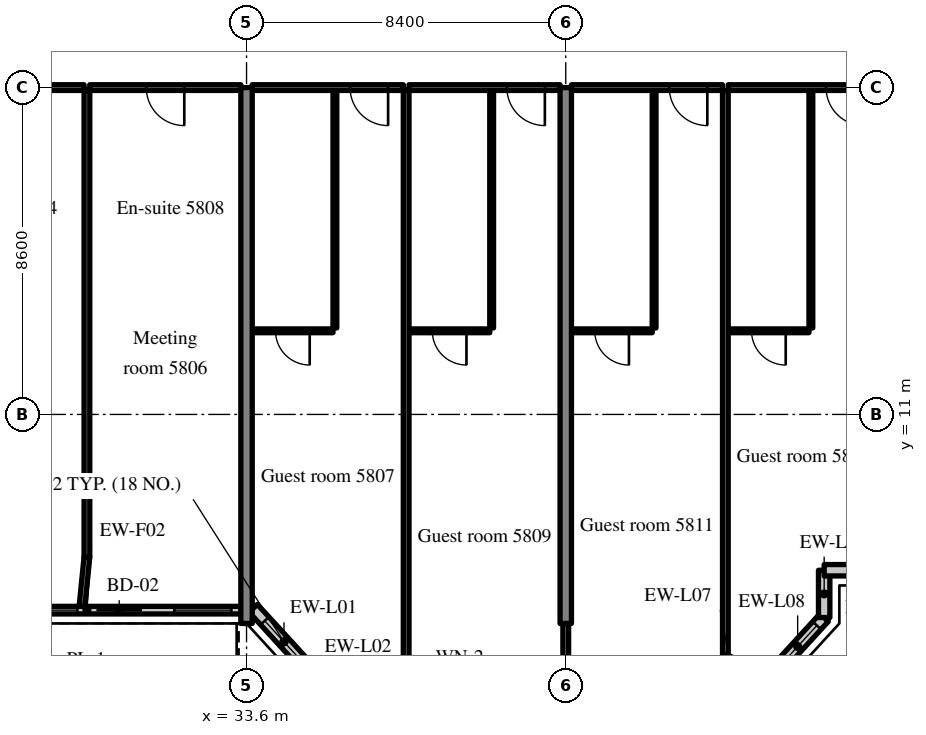
"""IFC4 building model, lengths in metres.
Left out: names, types, materials, properties, quantities, classifications, styles, units other than length and angle.
Written with IfcOpenShell. Run it as: python <this file> out.ifc"""

import sys

from ifc_helpers import new_model, si_unit, direction, frame, frame_2d, origin, place, context, subcontext, project, spatial, rectangle, extrude, source, transform, mapped, element, fill, save


model = new_model("IFC4")
c1 = context("Model", 3, precision=1e-05, world=origin(), true_north=direction((0.0, 1.0)))
c2 = subcontext(c1, "Body", "Model", "MODEL_VIEW")
j1 = project(units=[si_unit("LENGTHUNIT", "METRE"), si_unit("PLANEANGLEUNIT", "RADIAN")], contexts=[c1])
p1 = place(None, origin())
s1 = spatial("IfcSite", under=j1, at=p1, CompositionType="ELEMENT")
p2 = place(p1, origin())
s2 = spatial("IfcBuilding", under=s1, at=p2, CompositionType="ELEMENT")
p3 = place(p2, frame((0.0, 0.0, 241.3)))
s3 = spatial("IfcBuildingStorey", under=s2, at=p3, CompositionType="ELEMENT", Elevation=241.3)
m1 = source(origin(), c2, "Body", "SweptSolid", [
    extrude(rectangle(XDim=14.1, YDim=0.3, at=frame_2d((7.05, 0.0))), origin(), (0.0, 0.0, 1.0), 3.62),
])
for number, where, z_axis, x_axis in (
    (1, (33.6, 5.5, 0.0), (0.0, 0.0, 1.0), (0.0, 1.0, 0.0)),
    (2, (42.0, 5.5, 0.0), (0.0, 0.0, 1.0), (0.0, 1.0, 0.0)),
):
    element("IfcWall", number, at=place(p3, frame(where, z_axis=z_axis, x_axis=x_axis)), inside=s3, PredefinedType="SHEAR", context=c2, shape_type="MappedRepresentation", body=[
        mapped(m1, transform((0.0, 0.0, 0.0), scale=1.0)),
    ])
m2 = source(origin(), c2, "Body", "SweptSolid", [
    extrude(rectangle(XDim=8.1, YDim=0.2, at=frame_2d((4.05, 0.0))), origin(), (0.0, 0.0, 1.0), 3.02),
])
p4 = place(p3, frame((25.35, 5.85, 0.0), z_axis=(0.0, 0.0, 1.0), x_axis=(1.0, 0.0, 0.0)))
e3 = element("IfcWall", 3, at=p4, inside=s3, PredefinedType="SOLIDWALL", context=c2, shape_type="MappedRepresentation", body=[
    mapped(m2, transform((0.0, 0.0, 0.0), scale=1.0)),
])
m3 = source(origin(), c2, "Body", "SweptSolid", [
    extrude(rectangle(XDim=1.2, YDim=2.4, at=frame_2d((0.6, 1.2))), frame((0.0, 0.11, 0.0), z_axis=(0.0, -1.0, 0.0), x_axis=(1.0, 0.0, 0.0)), (0.0, 0.0, 1.0), 0.22),
])
p5 = place(p4, frame((0.25, 0.0, 0.0)))
e4 = element("IfcOpeningElement", 4, at=p5, cuts=e3, PredefinedType="OPENING", context=c2, shape_type="MappedRepresentation", body=[
    mapped(m3, transform((0.0, 0.0, 0.0), scale=1.0)),
])
m4 = source(origin(), c2, "Body", "SweptSolid", [
    extrude(rectangle(XDim=1.5, YDim=1.5, at=frame_2d((0.75, 0.75))), frame((0.0, 0.11, 0.0), z_axis=(0.0, -1.0, 0.0), x_axis=(1.0, 0.0, 0.0)), (0.0, 0.0, 1.0), 0.22),
])
p6 = place(p4, frame((2.3, 0.0, 0.9)))
e5 = element("IfcOpeningElement", 5, at=p6, cuts=e3, PredefinedType="OPENING", context=c2, shape_type="MappedRepresentation", body=[
    mapped(m4, transform((0.0, 0.0, 0.0), scale=1.0)),
])
p7 = place(p4, frame((4.3, 0.0, 0.0)))
e6 = element("IfcOpeningElement", 6, at=p7, cuts=e3, PredefinedType="OPENING", context=c2, shape_type="MappedRepresentation", body=[
    mapped(m3, transform((0.0, 0.0, 0.0), scale=1.0)),
])
p8 = place(p4, frame((6.35, 0.0, 0.9)))
e7 = element("IfcOpeningElement", 7, at=p8, cuts=e3, PredefinedType="OPENING", context=c2, shape_type="MappedRepresentation", body=[
    mapped(m4, transform((0.0, 0.0, 0.0), scale=1.0)),
])
m5 = source(origin(), c2, "Body", "SweptSolid", [
    extrude(rectangle(XDim=2.398, YDim=0.3, at=frame_2d((1.199, 0.0))), origin(), (0.0, 0.0, 1.0), 3.62),
])
p9 = place(p3, frame((33.776, 5.9, 0.0), z_axis=(0.0, 0.0, 1.0), x_axis=(0.675374189419, -0.737475222815, 0.0)))
e8 = element("IfcWall", 8, at=p9, inside=s3, PredefinedType="SOLIDWALL", context=c2, shape_type="MappedRepresentation", body=[
    mapped(m5, transform((0.0, 0.0, 0.0), scale=1.0)),
])
m6 = source(origin(), c2, "Body", "SweptSolid", [
    extrude(rectangle(XDim=1.5, YDim=2.0, at=frame_2d((0.75, 1.0))), frame((0.0, 0.16, 0.0), z_axis=(0.0, -1.0, 0.0), x_axis=(1.0, 0.0, 0.0)), (0.0, 0.0, 1.0), 0.32),
])
p10 = place(p9, frame((0.449, 0.0, 0.9)))
e9 = element("IfcOpeningElement", 9, at=p10, cuts=e8, PredefinedType="OPENING", context=c2, shape_type="MappedRepresentation", body=[
    mapped(m6, transform((0.0, 0.0, 0.0), scale=1.0)),
])
m7 = source(origin(), c2, "Body", "SweptSolid", [
    extrude(rectangle(XDim=2.067, YDim=0.3, at=frame_2d((1.033, 0.0))), origin(), (0.0, 0.0, 1.0), 3.62),
])
p11 = place(p3, frame((47.404, 4.131, 0.0), z_axis=(0.0, 0.0, 1.0), x_axis=(0.675355439877, 0.737492393065, 0.0)))
e10 = element("IfcWall", 10, at=p11, inside=s3, PredefinedType="SOLIDWALL", context=c2, shape_type="MappedRepresentation", body=[
    mapped(m7, transform((0.0, 0.0, 0.0), scale=1.0)),
])
p12 = place(p11, frame((0.283, 0.0, 0.9)))
e11 = element("IfcOpeningElement", 11, at=p12, cuts=e10, PredefinedType="OPENING", context=c2, shape_type="MappedRepresentation", body=[
    mapped(m6, transform((0.0, 0.0, 0.0), scale=1.0)),
])
m8 = source(origin(), c2, "Body", "SweptSolid", [
    extrude(rectangle(XDim=1.244, YDim=0.3, at=frame_2d((0.622, 0.0))), origin(), (0.0, 0.0, 1.0), 3.62),
])
p13 = place(p3, frame((48.8, 5.656, 0.0), z_axis=(0.0, 0.0, 1.0), x_axis=(0.0, 1.0, 0.0)))
e12 = element("IfcWall", 12, at=p13, inside=s3, PredefinedType="SOLIDWALL", context=c2, shape_type="MappedRepresentation", body=[
    mapped(m8, transform((0.0, 0.0, 0.0), scale=1.0)),
])
m9 = source(origin(), c2, "Body", "SweptSolid", [
    extrude(rectangle(XDim=3.2, YDim=0.3, at=frame_2d((1.6, 0.0))), origin(), (0.0, 0.0, 1.0), 3.62),
])
p14 = place(p3, frame((48.8, 6.9, 0.0), z_axis=(0.0, 0.0, 1.0), x_axis=(1.0, 0.0, 0.0)))
e13 = element("IfcWall", 13, at=p14, inside=s3, PredefinedType="SOLIDWALL", context=c2, shape_type="MappedRepresentation", body=[
    mapped(m9, transform((0.0, 0.0, 0.0), scale=1.0)),
])
m10 = source(origin(), c2, "Body", "SweptSolid", [
    extrude(rectangle(XDim=3.975, YDim=0.15, at=frame_2d((1.987, 0.0))), origin(), (0.0, 0.0, 1.0), 2.92),
])
p15 = place(p3, frame((25.35, 19.6, 0.0), z_axis=(0.0, 0.0, 1.0), x_axis=(1.0, 0.0, 0.0)))
e14 = element("IfcWall", 14, at=p15, inside=s3, PredefinedType="PARTITIONING", context=c2, shape_type="MappedRepresentation", body=[
    mapped(m10, transform((0.0, 0.0, 0.0), scale=1.0)),
])
m11 = source(origin(), c2, "Body", "SweptSolid", [
    extrude(rectangle(XDim=1.0, YDim=2.1, at=frame_2d((0.5, 1.05))), frame((0.0, 0.085, 0.0), z_axis=(0.0, -1.0, 0.0), x_axis=(1.0, 0.0, 0.0)), (0.0, 0.0, 1.0), 0.17),
])
p16 = place(p15, frame((1.487, 0.0, 0.0)))
e15 = element("IfcOpeningElement", 15, at=p16, cuts=e14, PredefinedType="OPENING", context=c2, shape_type="MappedRepresentation", body=[
    mapped(m11, transform((0.0, 0.0, 0.0), scale=1.0)),
])
p17 = place(p3, frame((29.475, 19.6, 0.0), z_axis=(0.0, 0.0, 1.0), x_axis=(1.0, 0.0, 0.0)))
e16 = element("IfcWall", 16, at=p17, inside=s3, PredefinedType="PARTITIONING", context=c2, shape_type="MappedRepresentation", body=[
    mapped(m10, transform((0.0, 0.0, 0.0), scale=1.0)),
])
p18 = place(p17, frame((1.487, 0.0, 0.0)))
e17 = element("IfcOpeningElement", 17, at=p18, cuts=e16, PredefinedType="OPENING", context=c2, shape_type="MappedRepresentation", body=[
    mapped(m11, transform((0.0, 0.0, 0.0), scale=1.0)),
])
m12 = source(origin(), c2, "Body", "SweptSolid", [
    extrude(rectangle(XDim=12.275, YDim=0.15, at=frame_2d((6.137, 0.0))), origin(), (0.0, 0.0, 1.0), 3.62),
])
p19 = place(p3, frame((29.4, 7.25, 0.0), z_axis=(0.0, 0.0, 1.0), x_axis=(0.0, 1.0, 0.0)))
e18 = element("IfcWall", 18, at=p19, inside=s3, PredefinedType="PARTITIONING", context=c2, shape_type="MappedRepresentation", body=[
    mapped(m12, transform((0.0, 0.0, 0.0), scale=1.0)),
])
m13 = source(origin(), c2, "Body", "SweptSolid", [
    extrude(rectangle(XDim=6.25, YDim=0.1, at=frame_2d((3.125, 0.0))), origin(), (0.0, 0.0, 1.0), 3.62),
])
p20 = place(p3, frame((35.925, 13.275, 0.0), z_axis=(0.0, 0.0, 1.0), x_axis=(0.0, 1.0, 0.0)))
e19 = element("IfcWall", 19, at=p20, inside=s3, PredefinedType="PARTITIONING", context=c2, shape_type="MappedRepresentation", body=[
    mapped(m13, transform((0.0, 0.0, 0.0), scale=1.0)),
])
m14 = source(origin(), c2, "Body", "SweptSolid", [
    extrude(rectangle(XDim=2.125, YDim=0.1, at=frame_2d((1.062, 0.0))), origin(), (0.0, 0.0, 1.0), 3.62),
])
p21 = place(p3, frame((33.75, 13.2, 0.0), z_axis=(0.0, 0.0, 1.0), x_axis=(1.0, 0.0, 0.0)))
e20 = element("IfcWall", 20, at=p21, inside=s3, PredefinedType="PARTITIONING", context=c2, shape_type="MappedRepresentation", body=[
    mapped(m14, transform((0.0, 0.0, 0.0), scale=1.0)),
])
m15 = source(origin(), c2, "Body", "SweptSolid", [
    extrude(rectangle(XDim=0.9, YDim=2.1, at=frame_2d((0.45, 1.05))), frame((0.0, 0.06, 0.0), z_axis=(0.0, -1.0, 0.0), x_axis=(1.0, 0.0, 0.0)), (0.0, 0.0, 1.0), 0.12),
])
p22 = place(p21, frame((0.612, 0.0, 0.0)))
e21 = element("IfcOpeningElement", 21, at=p22, cuts=e20, PredefinedType="OPENING", context=c2, shape_type="MappedRepresentation", body=[
    mapped(m15, transform((0.0, 0.0, 0.0), scale=1.0)),
])
m16 = source(origin(), c2, "Body", "SweptSolid", [
    extrude(rectangle(XDim=3.975, YDim=0.15, at=frame_2d((1.988, 0.0))), origin(), (0.0, 0.0, 1.0), 2.92),
])
p23 = place(p3, frame((33.75, 19.6, 0.0), z_axis=(0.0, 0.0, 1.0), x_axis=(1.0, 0.0, 0.0)))
e22 = element("IfcWall", 22, at=p23, inside=s3, PredefinedType="PARTITIONING", context=c2, shape_type="MappedRepresentation", body=[
    mapped(m16, transform((0.0, 0.0, 0.0), scale=1.0)),
])
p24 = place(p23, frame((2.575, 0.0, 0.0)))
e23 = element("IfcOpeningElement", 23, at=p24, cuts=e22, PredefinedType="OPENING", context=c2, shape_type="MappedRepresentation", body=[
    mapped(m11, transform((0.0, 0.0, 0.0), scale=1.0)),
])
p25 = place(p3, frame((40.05, 13.275, 0.0), z_axis=(0.0, 0.0, 1.0), x_axis=(0.0, 1.0, 0.0)))
e24 = element("IfcWall", 24, at=p25, inside=s3, PredefinedType="PARTITIONING", context=c2, shape_type="MappedRepresentation", body=[
    mapped(m13, transform((0.0, 0.0, 0.0), scale=1.0)),
])
p26 = place(p3, frame((37.875, 13.2, 0.0), z_axis=(0.0, 0.0, 1.0), x_axis=(1.0, 0.0, 0.0)))
e25 = element("IfcWall", 25, at=p26, inside=s3, PredefinedType="PARTITIONING", context=c2, shape_type="MappedRepresentation", body=[
    mapped(m14, transform((0.0, 0.0, 0.0), scale=1.0)),
])
p27 = place(p26, frame((0.612, 0.0, 0.0)))
e26 = element("IfcOpeningElement", 26, at=p27, cuts=e25, PredefinedType="OPENING", context=c2, shape_type="MappedRepresentation", body=[
    mapped(m15, transform((0.0, 0.0, 0.0), scale=1.0)),
])
p28 = place(p3, frame((37.875, 19.6, 0.0), z_axis=(0.0, 0.0, 1.0), x_axis=(1.0, 0.0, 0.0)))
e27 = element("IfcWall", 27, at=p28, inside=s3, PredefinedType="PARTITIONING", context=c2, shape_type="MappedRepresentation", body=[
    mapped(m16, transform((0.0, 0.0, 0.0), scale=1.0)),
])
p29 = place(p28, frame((2.575, 0.0, 0.0)))
e28 = element("IfcOpeningElement", 28, at=p29, cuts=e27, PredefinedType="OPENING", context=c2, shape_type="MappedRepresentation", body=[
    mapped(m11, transform((0.0, 0.0, 0.0), scale=1.0)),
])
m17 = source(origin(), c2, "Body", "SweptSolid", [
    extrude(rectangle(XDim=15.498, YDim=0.15, at=frame_2d((7.749, 0.0))), origin(), (0.0, 0.0, 1.0), 3.62),
])
p30 = place(p3, frame((37.8, 4.027, 0.0), z_axis=(0.0, 0.0, 1.0), x_axis=(0.0, 1.0, 0.0)))
e29 = element("IfcWall", 29, at=p30, inside=s3, PredefinedType="PARTITIONING", context=c2, shape_type="MappedRepresentation", body=[
    mapped(m17, transform((0.0, 0.0, 0.0), scale=1.0)),
])
p31 = place(p3, frame((44.325, 13.275, 0.0), z_axis=(0.0, 0.0, 1.0), x_axis=(0.0, 1.0, 0.0)))
e30 = element("IfcWall", 30, at=p31, inside=s3, PredefinedType="PARTITIONING", context=c2, shape_type="MappedRepresentation", body=[
    mapped(m13, transform((0.0, 0.0, 0.0), scale=1.0)),
])
p32 = place(p3, frame((42.15, 13.2, 0.0), z_axis=(0.0, 0.0, 1.0), x_axis=(1.0, 0.0, 0.0)))
e31 = element("IfcWall", 31, at=p32, inside=s3, PredefinedType="PARTITIONING", context=c2, shape_type="MappedRepresentation", body=[
    mapped(m14, transform((0.0, 0.0, 0.0), scale=1.0)),
])
p33 = place(p32, frame((0.613, 0.0, 0.0)))
e32 = element("IfcOpeningElement", 32, at=p33, cuts=e31, PredefinedType="OPENING", context=c2, shape_type="MappedRepresentation", body=[
    mapped(m15, transform((0.0, 0.0, 0.0), scale=1.0)),
])
p34 = place(p3, frame((42.15, 19.6, 0.0), z_axis=(0.0, 0.0, 1.0), x_axis=(1.0, 0.0, 0.0)))
e33 = element("IfcWall", 33, at=p34, inside=s3, PredefinedType="PARTITIONING", context=c2, shape_type="MappedRepresentation", body=[
    mapped(m16, transform((0.0, 0.0, 0.0), scale=1.0)),
])
p35 = place(p34, frame((2.575, 0.0, 0.0)))
e34 = element("IfcOpeningElement", 34, at=p35, cuts=e33, PredefinedType="OPENING", context=c2, shape_type="MappedRepresentation", body=[
    mapped(m11, transform((0.0, 0.0, 0.0), scale=1.0)),
])
p36 = place(p3, frame((48.45, 13.275, 0.0), z_axis=(0.0, 0.0, 1.0), x_axis=(0.0, 1.0, 0.0)))
e35 = element("IfcWall", 35, at=p36, inside=s3, PredefinedType="PARTITIONING", context=c2, shape_type="MappedRepresentation", body=[
    mapped(m13, transform((0.0, 0.0, 0.0), scale=1.0)),
])
p37 = place(p3, frame((46.275, 13.2, 0.0), z_axis=(0.0, 0.0, 1.0), x_axis=(1.0, 0.0, 0.0)))
e36 = element("IfcWall", 36, at=p37, inside=s3, PredefinedType="PARTITIONING", context=c2, shape_type="MappedRepresentation", body=[
    mapped(m14, transform((0.0, 0.0, 0.0), scale=1.0)),
])
p38 = place(p37, frame((0.613, 0.0, 0.0)))
e37 = element("IfcOpeningElement", 37, at=p38, cuts=e36, PredefinedType="OPENING", context=c2, shape_type="MappedRepresentation", body=[
    mapped(m15, transform((0.0, 0.0, 0.0), scale=1.0)),
])
p39 = place(p3, frame((46.275, 19.6, 0.0), z_axis=(0.0, 0.0, 1.0), x_axis=(1.0, 0.0, 0.0)))
e38 = element("IfcWall", 38, at=p39, inside=s3, PredefinedType="PARTITIONING", context=c2, shape_type="MappedRepresentation", body=[
    mapped(m16, transform((0.0, 0.0, 0.0), scale=1.0)),
])
p40 = place(p39, frame((2.575, 0.0, 0.0)))
e39 = element("IfcOpeningElement", 39, at=p40, cuts=e38, PredefinedType="OPENING", context=c2, shape_type="MappedRepresentation", body=[
    mapped(m11, transform((0.0, 0.0, 0.0), scale=1.0)),
])
m18 = source(origin(), c2, "Body", "SweptSolid", [
    extrude(rectangle(XDim=14.906, YDim=0.15, at=frame_2d((7.453, 0.0))), origin(), (0.0, 0.0, 1.0), 3.62),
])
p41 = place(p3, frame((46.2, 4.619, 0.0), z_axis=(0.0, 0.0, 1.0), x_axis=(0.0, 1.0, 0.0)))
e40 = element("IfcWall", 40, at=p41, inside=s3, PredefinedType="PARTITIONING", context=c2, shape_type="MappedRepresentation", body=[
    mapped(m18, transform((0.0, 0.0, 0.0), scale=1.0)),
])
m19 = source(origin(), c2, "Body", "SweptSolid", [
    extrude(rectangle(XDim=2.178, YDim=0.15, at=frame_2d((1.089, 0.0))), origin(), (0.0, 0.0, 1.0), 3.62),
])
p42 = place(p3, frame((42.0, 3.322, 0.0), z_axis=(0.0, 0.0, 1.0), x_axis=(0.0, 1.0, 0.0)))
e41 = element("IfcWall", 41, at=p42, inside=s3, PredefinedType="PARTITIONING", context=c2, shape_type="MappedRepresentation", body=[
    mapped(m19, transform((0.0, 0.0, 0.0), scale=1.0)),
])
m20 = source(origin(), c2, "Body", "SweptSolid", [
    extrude(rectangle(XDim=1.307, YDim=0.15, at=frame_2d((0.653, 0.0))), origin(), (0.0, 0.0, 1.0), 3.62),
])
p43 = place(p3, frame((29.27, 5.95, 0.0), z_axis=(0.0, 0.0, 1.0), x_axis=(0.099411212066, 0.995046436562, 0.0)))
e42 = element("IfcWall", 42, at=p43, inside=s3, PredefinedType="PARTITIONING", context=c2, shape_type="MappedRepresentation", body=[
    mapped(m20, transform((0.0, 0.0, 0.0), scale=1.0)),
])
m21 = source(origin(), c2, "Body", "SweptSolid", [
    extrude(rectangle(XDim=1.058, YDim=0.15, at=frame_2d((0.529, 0.0))), origin(), (0.0, 0.0, 1.0), 3.62),
])
p44 = place(p3, frame((47.14, 4.134, 0.0), z_axis=(0.0, 0.0, 1.0), x_axis=(-0.888723819054, 0.458442988218, 0.0)))
e43 = element("IfcWall", 43, at=p44, inside=s3, PredefinedType="PARTITIONING", context=c2, shape_type="MappedRepresentation", body=[
    mapped(m21, transform((0.0, 0.0, 0.0), scale=1.0)),
])
m22 = source(origin(), c2, "Body", "SweptSolid", [
    extrude(rectangle(XDim=1.5, YDim=1.5, at=frame_2d((0.75, 0.75))), frame((0.0, 0.03, 0.0), z_axis=(0.0, -1.0, 0.0), x_axis=(1.0, 0.0, 0.0)), (0.0, 0.0, 1.0), 0.06),
])
p45 = place(p6, origin())
e44 = element("IfcWindow", 44, at=p45, inside=s3, PartitioningType="SINGLE_PANEL", PredefinedType="WINDOW", context=c2, shape_type="MappedRepresentation", body=[
    mapped(m22, transform((0.0, 0.0, 0.0), scale=1.0)),
])
fill(e5, e44)
m23 = source(origin(), c2, "Body", "SweptSolid", [
    extrude(rectangle(XDim=1.2, YDim=2.4, at=frame_2d((0.6, 1.2))), frame((0.0, 0.025, 0.0), z_axis=(0.0, -1.0, 0.0), x_axis=(1.0, 0.0, 0.0)), (0.0, 0.0, 1.0), 0.05),
])
p46 = place(p7, origin())
e45 = element("IfcDoor", 45, at=p46, inside=s3, OperationType="SLIDING_TO_RIGHT", PredefinedType="DOOR", context=c2, shape_type="MappedRepresentation", body=[
    mapped(m23, transform((0.0, 0.0, 0.0), scale=1.0)),
])
fill(e6, e45)
p47 = place(p8, origin())
e46 = element("IfcWindow", 46, at=p47, inside=s3, PartitioningType="SINGLE_PANEL", PredefinedType="WINDOW", context=c2, shape_type="MappedRepresentation", body=[
    mapped(m22, transform((0.0, 0.0, 0.0), scale=1.0)),
])
fill(e7, e46)
m24 = source(origin(), c2, "Body", "SweptSolid", [
    extrude(rectangle(XDim=1.5, YDim=2.0, at=frame_2d((0.75, 1.0))), frame((0.0, 0.03, 0.0), z_axis=(0.0, -1.0, 0.0), x_axis=(1.0, 0.0, 0.0)), (0.0, 0.0, 1.0), 0.06),
])
p48 = place(p10, origin())
e47 = element("IfcWindow", 47, at=p48, inside=s3, PartitioningType="SINGLE_PANEL", PredefinedType="WINDOW", context=c2, shape_type="MappedRepresentation", body=[
    mapped(m24, transform((0.0, 0.0, 0.0), scale=1.0)),
])
fill(e9, e47)
p49 = place(p12, origin())
e48 = element("IfcWindow", 48, at=p49, inside=s3, PartitioningType="SINGLE_PANEL", PredefinedType="WINDOW", context=c2, shape_type="MappedRepresentation", body=[
    mapped(m24, transform((0.0, 0.0, 0.0), scale=1.0)),
])
fill(e11, e48)
m25 = source(origin(), c2, "Body", "SweptSolid", [
    extrude(rectangle(XDim=1.0, YDim=2.1, at=frame_2d((0.5, 1.05))), frame((0.0, 0.025, 0.0), z_axis=(0.0, -1.0, 0.0), x_axis=(1.0, 0.0, 0.0)), (0.0, 0.0, 1.0), 0.05),
])
p50 = place(p18, origin())
e49 = element("IfcDoor", 49, at=p50, inside=s3, OperationType="SINGLE_SWING_RIGHT", PredefinedType="DOOR", context=c2, shape_type="MappedRepresentation", body=[
    mapped(m25, transform((0.0, 0.0, 0.0), scale=1.0)),
])
fill(e17, e49)
m26 = source(origin(), c2, "Body", "SweptSolid", [
    extrude(rectangle(XDim=0.9, YDim=2.1, at=frame_2d((0.45, 1.05))), frame((0.0, 0.025, 0.0), z_axis=(0.0, -1.0, 0.0), x_axis=(1.0, 0.0, 0.0)), (0.0, 0.0, 1.0), 0.05),
])
p51 = place(p22, origin())
e50 = element("IfcDoor", 50, at=p51, inside=s3, OperationType="SINGLE_SWING_RIGHT", PredefinedType="DOOR", context=c2, shape_type="MappedRepresentation", body=[
    mapped(m26, transform((0.0, 0.0, 0.0), scale=1.0)),
])
fill(e21, e50)
p52 = place(p24, origin())
e51 = element("IfcDoor", 51, at=p52, inside=s3, OperationType="SINGLE_SWING_RIGHT", PredefinedType="DOOR", context=c2, shape_type="MappedRepresentation", body=[
    mapped(m25, transform((0.0, 0.0, 0.0), scale=1.0)),
])
fill(e23, e51)
p53 = place(p27, origin())
e52 = element("IfcDoor", 52, at=p53, inside=s3, OperationType="SINGLE_SWING_RIGHT", PredefinedType="DOOR", context=c2, shape_type="MappedRepresentation", body=[
    mapped(m26, transform((0.0, 0.0, 0.0), scale=1.0)),
])
fill(e26, e52)
p54 = place(p29, origin())
e53 = element("IfcDoor", 53, at=p54, inside=s3, OperationType="SINGLE_SWING_RIGHT", PredefinedType="DOOR", context=c2, shape_type="MappedRepresentation", body=[
    mapped(m25, transform((0.0, 0.0, 0.0), scale=1.0)),
])
fill(e28, e53)
p55 = place(p33, origin())
e54 = element("IfcDoor", 54, at=p55, inside=s3, OperationType="SINGLE_SWING_RIGHT", PredefinedType="DOOR", context=c2, shape_type="MappedRepresentation", body=[
    mapped(m26, transform((0.0, 0.0, 0.0), scale=1.0)),
])
fill(e32, e54)
p56 = place(p35, origin())
e55 = element("IfcDoor", 55, at=p56, inside=s3, OperationType="SINGLE_SWING_RIGHT", PredefinedType="DOOR", context=c2, shape_type="MappedRepresentation", body=[
    mapped(m25, transform((0.0, 0.0, 0.0), scale=1.0)),
])
fill(e34, e55)
p57 = place(p38, origin())
e56 = element("IfcDoor", 56, at=p57, inside=s3, OperationType="SINGLE_SWING_RIGHT", PredefinedType="DOOR", context=c2, shape_type="MappedRepresentation", body=[
    mapped(m26, transform((0.0, 0.0, 0.0), scale=1.0)),
])
fill(e37, e56)
p58 = place(p40, origin())
e57 = element("IfcDoor", 57, at=p58, inside=s3, OperationType="SINGLE_SWING_RIGHT", PredefinedType="DOOR", context=c2, shape_type="MappedRepresentation", body=[
    mapped(m25, transform((0.0, 0.0, 0.0), scale=1.0)),
])
fill(e39, e57)
save(model, sys.argv[1])
